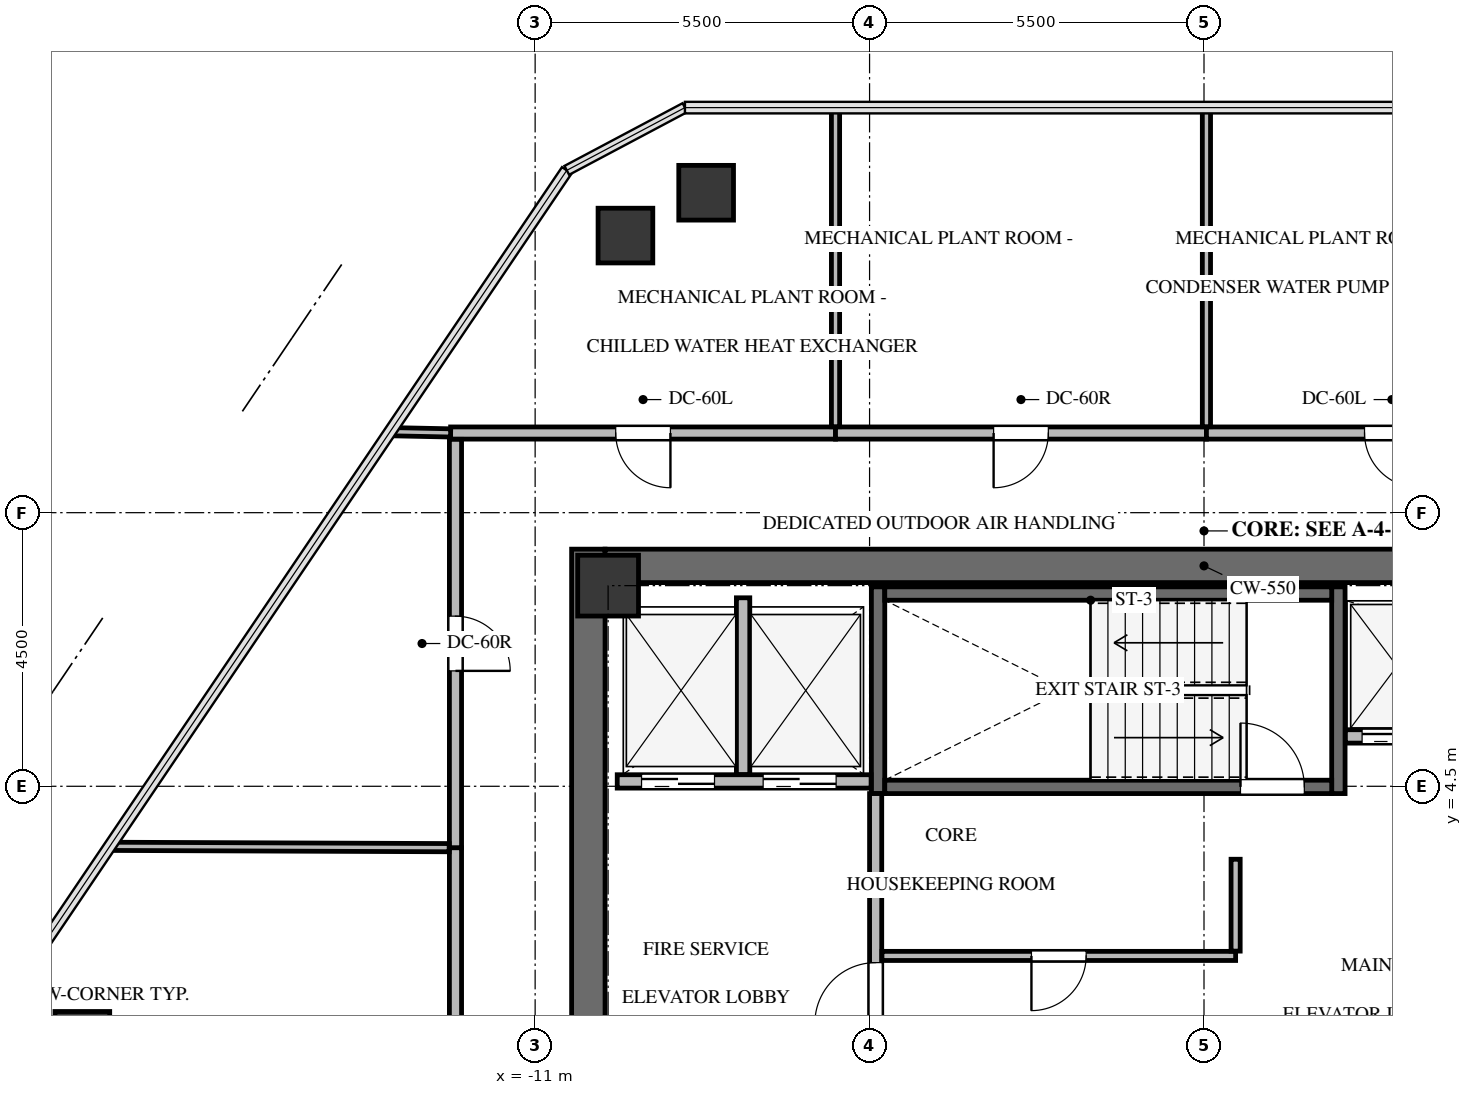
"""IFC4 building model, lengths in metres.
Left out: names, types, materials, properties, quantities, classifications, styles, units other than length and angle.
Written with IfcOpenShell. Run it as: python <this file> out.ifc"""

import sys

from ifc_helpers import new_model, si_unit, direction, frame, frame_2d, origin, origin_2d, place, context, subcontext, project, spatial, rectangle, extrude, source, transform, mapped, element, fill, save


model = new_model("IFC4")
c1 = context("Model", 3, precision=1e-05, world=origin(), true_north=direction((0.0, 1.0)))
c2 = subcontext(c1, "Body", "Model", "MODEL_VIEW")
j1 = project(units=[si_unit("LENGTHUNIT", "METRE"), si_unit("PLANEANGLEUNIT", "RADIAN")], contexts=[c1])
p1 = place(None, origin())
s1 = spatial("IfcSite", under=j1, at=p1, CompositionType="ELEMENT")
p2 = place(p1, origin())
s2 = spatial("IfcBuilding", under=s1, at=p2, CompositionType="ELEMENT")
p3 = place(p2, frame((0.0, 0.0, 264.9)))
s3 = spatial("IfcBuildingStorey", under=s2, at=p3, CompositionType="ELEMENT", Elevation=264.9)
p4 = place(p3, frame((-10.125, -8.4, 0.0), z_axis=(0.0, 0.0, 1.0), x_axis=(0.0, 1.0, 0.0)))
e1 = element("IfcWall", 1, at=p4, inside=s3, PredefinedType="SHEAR", context=c2, shape_type="SweptSolid", body=[
    extrude(rectangle(XDim=16.8, YDim=0.55, at=frame_2d((8.4, 0.0))), origin(), (0.0, 0.0, 1.0), 3.4),
])
p5 = place(p3, frame((-9.85, 8.125, 0.0), z_axis=(0.0, 0.0, 1.0), x_axis=(1.0, 0.0, 0.0)))
e2 = element("IfcWall", 2, at=p5, inside=s3, PredefinedType="SHEAR", context=c2, shape_type="SweptSolid", body=[
    extrude(rectangle(XDim=19.7, YDim=0.55, at=frame_2d((9.85, 0.0))), origin(), (0.0, 0.0, 1.0), 3.4),
])
for number, where, z_axis, x_axis in (
    (3, (2.21, 4.38, -0.3), (0.0, 0.0, 1.0), (0.0, 1.0, 0.0)),
    (4, (-5.36, 7.78, -0.3), (0.0, 0.0, 1.0), (0.0, -1.0, 0.0)),
):
    element("IfcWall", number, at=place(p3, frame(where, z_axis=z_axis, x_axis=x_axis)), inside=s3, PredefinedType="SHEAR", context=c2, shape_type="SweptSolid", body=[
        extrude(rectangle(XDim=3.4, YDim=0.22, at=frame_2d((1.7, 0.0))), origin(), (0.0, 0.0, 1.0), 3.4),
    ])
p6 = place(p3, frame((-5.25, 4.49, -0.3), z_axis=(0.0, 0.0, 1.0), x_axis=(1.0, 0.0, 0.0)))
e5 = element("IfcWall", 5, at=p6, inside=s3, PredefinedType="SHEAR", context=c2, shape_type="SweptSolid", body=[
    extrude(rectangle(XDim=7.35, YDim=0.22, at=frame_2d((3.675, 0.0))), origin(), (0.0, 0.0, 1.0), 3.4),
])
p7 = place(p6, frame((5.85, 0.0, 0.0)))
e6 = element("IfcOpeningElement", 6, at=p7, cuts=e5, PredefinedType="OPENING", context=c2, shape_type="SweptSolid", body=[
    extrude(rectangle(XDim=1.05, YDim=2.15, at=frame_2d((0.525, 1.075))), frame((0.0, 0.12, 0.0), z_axis=(0.0, -1.0, 0.0), x_axis=(1.0, 0.0, 0.0)), (0.0, 0.0, 1.0), 0.24),
])
p8 = place(p3, frame((2.1, 7.67, -0.3), z_axis=(0.0, 0.0, 1.0), x_axis=(-1.0, 0.0, 0.0)))
e7 = element("IfcWall", 7, at=p8, inside=s3, PredefinedType="SHEAR", context=c2, shape_type="SweptSolid", body=[
    extrude(rectangle(XDim=7.35, YDim=0.22, at=frame_2d((3.675, 0.0))), origin(), (0.0, 0.0, 1.0), 3.4),
])
m1 = source(origin(), c2, "Body", "SweptSolid", [
    extrude(rectangle(XDim=1.0, YDim=1.0, at=origin_2d()), origin(), (0.0, 0.0, 1.0), 3.4),
])
p9 = place(p3, frame((-9.8, 7.8, -0.3), z_axis=(0.0, 0.0, 1.0), x_axis=(1.0, 0.0, 0.0)))
e8 = element("IfcColumn", 8, at=p9, inside=s3, PredefinedType="COLUMN", context=c2, shape_type="MappedRepresentation", body=[
    mapped(m1, transform((0.0, 0.0, 0.0), x_axis=(1.0, 0.0, 0.0), y_axis=(0.0, 1.0, 0.0), z_axis=(0.0, 0.0, 1.0), scale=1.0)),
])
m2 = source(origin(), c2, "Body", "SweptSolid", [
    extrude(rectangle(XDim=0.9, YDim=0.9, at=origin_2d()), origin(), (0.0, 0.0, 1.0), 3.4),
])
for number, where, z_axis, x_axis in (
    (9, (-18.446, 0.346, -0.3), (0.0, 0.0, 1.0), (1.0, 0.0, 0.0)),
    (10, (-9.515, 13.557, -0.3), (0.0, 0.0, 1.0), (1.0, 0.0, 0.0)),
    (11, (-8.188, 14.262, -0.3), (0.0, 0.0, 1.0), (1.0, 0.0, 0.0)),
):
    element("IfcColumn", number, at=place(p3, frame(where, z_axis=z_axis, x_axis=x_axis)), inside=s3, PredefinedType="COLUMN", context=c2, shape_type="MappedRepresentation", body=[
        mapped(m2, transform((0.0, 0.0, 0.0), x_axis=(1.0, 0.0, 0.0), y_axis=(0.0, 1.0, 0.0), z_axis=(0.0, 0.0, 1.0), scale=1.0)),
    ])
p10 = place(p3, frame((-9.65, 4.58, 0.0), z_axis=(0.0, 0.0, 1.0), x_axis=(1.0, 0.0, 0.0)))
e12 = element("IfcWall", 12, at=p10, inside=s3, PredefinedType="SOLIDWALL", context=c2, shape_type="SweptSolid", body=[
    extrude(rectangle(XDim=4.175, YDim=0.22, at=frame_2d((2.087, 0.0))), origin(), (0.0, 0.0, 1.0), 3.085),
])
p11 = place(p10, frame((0.4, 0.0, 0.0)))
e13 = element("IfcOpeningElement", 13, at=p11, cuts=e12, PredefinedType="OPENING", context=c2, shape_type="SweptSolid", body=[
    extrude(rectangle(XDim=1.2, YDim=2.15, at=frame_2d((0.6, 1.075))), frame((0.0, 0.12, 0.0), z_axis=(0.0, -1.0, 0.0), x_axis=(1.0, 0.0, 0.0)), (0.0, 0.0, 1.0), 0.24),
])
p12 = place(p10, frame((2.4, 0.0, 0.0)))
e14 = element("IfcOpeningElement", 14, at=p12, cuts=e12, PredefinedType="OPENING", context=c2, shape_type="SweptSolid", body=[
    extrude(rectangle(XDim=1.2, YDim=2.15, at=frame_2d((0.6, 1.075))), frame((0.0, 0.12, 0.0), z_axis=(0.0, -1.0, 0.0), x_axis=(1.0, 0.0, 0.0)), (0.0, 0.0, 1.0), 0.24),
])
p13 = place(p3, frame((-7.58, 4.694, 0.0), z_axis=(0.0, 0.0, 1.0), x_axis=(0.0, 1.0, 0.0)))
e15 = element("IfcWall", 15, at=p13, inside=s3, PredefinedType="SOLIDWALL", context=c2, shape_type="SweptSolid", body=[
    extrude(rectangle(XDim=2.906, YDim=0.22, at=frame_2d((1.453, 0.0))), origin(), (0.0, 0.0, 1.0), 3.085),
])
p14 = place(p3, frame((-5.4, 0.354, 0.0), z_axis=(0.0, 0.0, 1.0), x_axis=(0.0, 1.0, 0.0)))
e16 = element("IfcWall", 16, at=p14, inside=s3, PredefinedType="SOLIDWALL", context=c2, shape_type="SweptSolid", body=[
    extrude(rectangle(XDim=4.026, YDim=0.2, at=frame_2d((2.013, 0.0))), origin(), (0.0, 0.0, 1.0), 3.085),
])
p15 = place(p14, frame((0.246, 0.0, 0.0)))
e17 = element("IfcOpeningElement", 17, at=p15, cuts=e16, PredefinedType="OPENING", context=c2, shape_type="SweptSolid", body=[
    extrude(rectangle(XDim=1.0, YDim=2.15, at=frame_2d((0.5, 1.075))), frame((0.0, 0.11, 0.0), z_axis=(0.0, -1.0, 0.0), x_axis=(1.0, 0.0, 0.0)), (0.0, 0.0, 1.0), 0.22),
])
p16 = place(p3, frame((2.325, 5.32, 0.0), z_axis=(0.0, 0.0, 1.0), x_axis=(1.0, 0.0, 0.0)))
e18 = element("IfcWall", 18, at=p16, inside=s3, PredefinedType="SOLIDWALL", context=c2, shape_type="SweptSolid", body=[
    extrude(rectangle(XDim=7.325, YDim=0.22, at=frame_2d((3.663, 0.0))), origin(), (0.0, 0.0, 1.0), 3.085),
])
p17 = place(p16, frame((0.275, 0.0, 0.0)))
e19 = element("IfcOpeningElement", 19, at=p17, cuts=e18, PredefinedType="OPENING", context=c2, shape_type="SweptSolid", body=[
    extrude(rectangle(XDim=1.1, YDim=2.15, at=frame_2d((0.55, 1.075))), frame((0.0, 0.12, 0.0), z_axis=(0.0, -1.0, 0.0), x_axis=(1.0, 0.0, 0.0)), (0.0, 0.0, 1.0), 0.24),
])
p18 = place(p16, frame((2.045, 0.0, 0.0)))
e20 = element("IfcOpeningElement", 20, at=p18, cuts=e18, PredefinedType="OPENING", context=c2, shape_type="SweptSolid", body=[
    extrude(rectangle(XDim=1.1, YDim=2.15, at=frame_2d((0.55, 1.075))), frame((0.0, 0.12, 0.0), z_axis=(0.0, -1.0, 0.0), x_axis=(1.0, 0.0, 0.0)), (0.0, 0.0, 1.0), 0.24),
])
p19 = place(p16, frame((3.815, 0.0, 0.0)))
e21 = element("IfcOpeningElement", 21, at=p19, cuts=e18, PredefinedType="OPENING", context=c2, shape_type="SweptSolid", body=[
    extrude(rectangle(XDim=1.1, YDim=2.15, at=frame_2d((0.55, 1.075))), frame((0.0, 0.12, 0.0), z_axis=(0.0, -1.0, 0.0), x_axis=(1.0, 0.0, 0.0)), (0.0, 0.0, 1.0), 0.24),
])
p20 = place(p16, frame((5.585, 0.0, 0.0)))
e22 = element("IfcOpeningElement", 22, at=p20, cuts=e18, PredefinedType="OPENING", context=c2, shape_type="SweptSolid", body=[
    extrude(rectangle(XDim=1.1, YDim=2.15, at=frame_2d((0.55, 1.075))), frame((0.0, 0.12, 0.0), z_axis=(0.0, -1.0, 0.0), x_axis=(1.0, 0.0, 0.0)), (0.0, 0.0, 1.0), 0.24),
])
p21 = place(p3, frame((0.52, 1.71, 0.0), z_axis=(0.0, 0.0, 1.0), x_axis=(-1.0, 0.0, 0.0)))
e23 = element("IfcWall", 23, at=p21, inside=s3, PredefinedType="PARTITIONING", context=c2, shape_type="SweptSolid", body=[
    extrude(rectangle(XDim=5.816, YDim=0.15, at=frame_2d((2.908, 0.0))), origin(), (0.0, 0.0, 1.0), 3.085),
])
p22 = place(p21, frame((2.458, 0.0, 0.0)))
e24 = element("IfcOpeningElement", 24, at=p22, cuts=e23, PredefinedType="OPENING", context=c2, shape_type="SweptSolid", body=[
    extrude(rectangle(XDim=0.9, YDim=2.05, at=frame_2d((0.45, 1.025))), frame((0.0, 0.085, 0.0), z_axis=(0.0, -1.0, 0.0), x_axis=(1.0, 0.0, 0.0)), (0.0, 0.0, 1.0), 0.17),
])
p23 = place(p3, frame((0.52, 3.3, 0.0), z_axis=(0.0, 0.0, 1.0), x_axis=(0.0, -1.0, 0.0)))
e25 = element("IfcWall", 25, at=p23, inside=s3, PredefinedType="PARTITIONING", context=c2, shape_type="SweptSolid", body=[
    extrude(rectangle(XDim=1.511, YDim=0.15, at=frame_2d((0.755, 0.0))), origin(), (0.0, 0.0, 1.0), 3.085),
])
p24 = place(p3, frame((-6.06, 10.31, 0.0), z_axis=(0.0, 0.0, 1.0), x_axis=(-1.0, 0.0, 0.0)))
e26 = element("IfcWall", 26, at=p24, inside=s3, PredefinedType="SOLIDWALL", context=c2, shape_type="SweptSolid", body=[
    extrude(rectangle(XDim=6.33, YDim=0.2, at=frame_2d((3.165, 0.0))), origin(), (0.0, 0.0, 1.0), 2.342),
])
p25 = place(p24, frame((2.715, 0.0, 0.0)))
e27 = element("IfcOpeningElement", 27, at=p25, cuts=e26, PredefinedType="OPENING", context=c2, shape_type="SweptSolid", body=[
    extrude(rectangle(XDim=0.9, YDim=2.05, at=frame_2d((0.45, 1.025))), frame((0.0, 0.11, 0.0), z_axis=(0.0, -1.0, 0.0), x_axis=(1.0, 0.0, 0.0)), (0.0, 0.0, 1.0), 0.22),
])
p26 = place(p3, frame((0.04, 10.31, 0.0), z_axis=(0.0, 0.0, 1.0), x_axis=(-1.0, 0.0, 0.0)))
e28 = element("IfcWall", 28, at=p26, inside=s3, PredefinedType="SOLIDWALL", context=c2, shape_type="SweptSolid", body=[
    extrude(rectangle(XDim=6.1, YDim=0.2, at=frame_2d((3.05, 0.0))), origin(), (0.0, 0.0, 1.0), 2.648),
])
p27 = place(p26, frame((2.6, 0.0, 0.0)))
e29 = element("IfcOpeningElement", 29, at=p27, cuts=e28, PredefinedType="OPENING", context=c2, shape_type="SweptSolid", body=[
    extrude(rectangle(XDim=0.9, YDim=2.05, at=frame_2d((0.45, 1.025))), frame((0.0, 0.11, 0.0), z_axis=(0.0, -1.0, 0.0), x_axis=(1.0, 0.0, 0.0)), (0.0, 0.0, 1.0), 0.22),
])
p28 = place(p3, frame((6.14, 10.31, 0.0), z_axis=(0.0, 0.0, 1.0), x_axis=(-1.0, 0.0, 0.0)))
e30 = element("IfcWall", 30, at=p28, inside=s3, PredefinedType="SOLIDWALL", context=c2, shape_type="SweptSolid", body=[
    extrude(rectangle(XDim=6.1, YDim=0.2, at=frame_2d((3.05, 0.0))), origin(), (0.0, 0.0, 1.0), 2.648),
])
p29 = place(p28, frame((2.6, 0.0, 0.0)))
e31 = element("IfcOpeningElement", 31, at=p29, cuts=e30, PredefinedType="OPENING", context=c2, shape_type="SweptSolid", body=[
    extrude(rectangle(XDim=0.9, YDim=2.05, at=frame_2d((0.45, 1.025))), frame((0.0, 0.11, 0.0), z_axis=(0.0, -1.0, 0.0), x_axis=(1.0, 0.0, 0.0)), (0.0, 0.0, 1.0), 0.22),
])
p30 = place(p3, frame((-12.31, 3.49, 0.0), z_axis=(0.0, 0.0, 1.0), x_axis=(0.0, -1.0, 0.0)))
e32 = element("IfcWall", 32, at=p30, inside=s3, PredefinedType="SOLIDWALL", context=c2, shape_type="SweptSolid", body=[
    extrude(rectangle(XDim=6.9, YDim=0.2, at=frame_2d((3.45, 0.0))), origin(), (0.0, 0.0, 1.0), 2.342),
])
p31 = place(p30, frame((3.0, 0.0, 0.0)))
e33 = element("IfcOpeningElement", 33, at=p31, cuts=e32, PredefinedType="OPENING", context=c2, shape_type="SweptSolid", body=[
    extrude(rectangle(XDim=0.9, YDim=2.05, at=frame_2d((0.45, 1.025))), frame((0.0, 0.11, 0.0), z_axis=(0.0, -1.0, 0.0), x_axis=(1.0, 0.0, 0.0)), (0.0, 0.0, 1.0), 0.22),
])
p32 = place(p3, frame((-12.31, 10.206, 0.0), z_axis=(0.0, 0.0, 1.0), x_axis=(0.0, -1.0, 0.0)))
e34 = element("IfcWall", 34, at=p32, inside=s3, PredefinedType="SOLIDWALL", context=c2, shape_type="SweptSolid", body=[
    extrude(rectangle(XDim=6.716, YDim=0.2, at=frame_2d((3.358, 0.0))), origin(), (0.0, 0.0, 1.0), 2.439),
])
p33 = place(p32, frame((2.908, 0.0, 0.0)))
e35 = element("IfcOpeningElement", 35, at=p33, cuts=e34, PredefinedType="OPENING", context=c2, shape_type="SweptSolid", body=[
    extrude(rectangle(XDim=0.9, YDim=2.05, at=frame_2d((0.45, 1.025))), frame((0.0, 0.11, 0.0), z_axis=(0.0, -1.0, 0.0), x_axis=(1.0, 0.0, 0.0)), (0.0, 0.0, 1.0), 0.22),
])
p34 = place(p3, frame((-6.06, 15.662, 0.0), z_axis=(0.0, 0.0, 1.0), x_axis=(0.0, -1.0, 0.0)))
e36 = element("IfcWall", 36, at=p34, inside=s3, PredefinedType="PARTITIONING", context=c2, shape_type="SweptSolid", body=[
    extrude(rectangle(XDim=5.248, YDim=0.135, at=frame_2d((2.624, 0.0))), origin(), (0.0, 0.0, 1.0), 2.439),
])
p35 = place(p3, frame((-12.39, 10.312, 0.0), z_axis=(0.0, 0.0, 1.0), x_axis=(-0.999782630862, 0.020849245246, 0.0)))
e37 = element("IfcWall", 37, at=p35, inside=s3, PredefinedType="PARTITIONING", context=c2, shape_type="SweptSolid", body=[
    extrude(rectangle(XDim=0.995, YDim=0.135, at=frame_2d((0.498, 0.0))), origin(), (0.0, 0.0, 1.0), 3.085),
])
p36 = place(p3, frame((0.04, 15.662, 0.0), z_axis=(0.0, 0.0, 1.0), x_axis=(0.0, -1.0, 0.0)))
e38 = element("IfcWall", 38, at=p36, inside=s3, PredefinedType="PARTITIONING", context=c2, shape_type="SweptSolid", body=[
    extrude(rectangle(XDim=5.248, YDim=0.135, at=frame_2d((2.624, 0.0))), origin(), (0.0, 0.0, 1.0), 2.439),
])
p37 = place(p3, frame((-17.996, 3.512, 0.0), z_axis=(0.0, 0.0, 1.0), x_axis=(0.99999225143, -0.003936632956, 0.0)))
e39 = element("IfcWall", 39, at=p37, inside=s3, PredefinedType="PARTITIONING", context=c2, shape_type="SweptSolid", body=[
    extrude(rectangle(XDim=5.582, YDim=0.135, at=frame_2d((2.791, 0.0))), origin(), (0.0, 0.0, 1.0), 2.439),
])
m3 = source(origin(), c2, "Body", "SweptSolid", [
    extrude(rectangle(XDim=1.05, YDim=2.15, at=frame_2d((0.525, 1.075))), frame((0.0, 0.025, 0.0), z_axis=(0.0, -1.0, 0.0), x_axis=(1.0, 0.0, 0.0)), (0.0, 0.0, 1.0), 0.05),
])
p38 = place(p7, origin())
e40 = element("IfcDoor", 40, at=p38, inside=s3, OperationType="SINGLE_SWING_LEFT", PredefinedType="DOOR", context=c2, shape_type="MappedRepresentation", body=[
    mapped(m3, transform((0.0, 0.0, 0.0), x_axis=(1.0, 0.0, 0.0), y_axis=(0.0, 1.0, 0.0), z_axis=(0.0, 0.0, 1.0), scale=1.0)),
])
fill(e6, e40)
m4 = source(origin(), c2, "Body", "SweptSolid", [
    extrude(rectangle(XDim=1.2, YDim=2.15, at=frame_2d((0.6, 1.075))), frame((0.0, 0.025, 0.0), z_axis=(0.0, -1.0, 0.0), x_axis=(1.0, 0.0, 0.0)), (0.0, 0.0, 1.0), 0.05),
])
p39 = place(p11, origin())
e41 = element("IfcDoor", 41, at=p39, inside=s3, OperationType="DOUBLE_DOOR_SLIDING", PredefinedType="DOOR", context=c2, shape_type="MappedRepresentation", body=[
    mapped(m4, transform((0.0, 0.0, 0.0), x_axis=(1.0, 0.0, 0.0), y_axis=(0.0, 1.0, 0.0), z_axis=(0.0, 0.0, 1.0), scale=1.0)),
])
fill(e13, e41)
p40 = place(p12, origin())
e42 = element("IfcDoor", 42, at=p40, inside=s3, OperationType="DOUBLE_DOOR_SLIDING", PredefinedType="DOOR", context=c2, shape_type="MappedRepresentation", body=[
    mapped(m4, transform((0.0, 0.0, 0.0), x_axis=(1.0, 0.0, 0.0), y_axis=(0.0, 1.0, 0.0), z_axis=(0.0, 0.0, 1.0), scale=1.0)),
])
fill(e14, e42)
m5 = source(origin(), c2, "Body", "SweptSolid", [
    extrude(rectangle(XDim=1.0, YDim=2.15, at=frame_2d((0.5, 1.075))), frame((0.0, 0.025, 0.0), z_axis=(0.0, -1.0, 0.0), x_axis=(1.0, 0.0, 0.0)), (0.0, 0.0, 1.0), 0.05),
])
p41 = place(p15, origin())
e43 = element("IfcDoor", 43, at=p41, inside=s3, OperationType="SINGLE_SWING_LEFT", PredefinedType="DOOR", context=c2, shape_type="MappedRepresentation", body=[
    mapped(m5, transform((0.0, 0.0, 0.0), x_axis=(1.0, 0.0, 0.0), y_axis=(0.0, 1.0, 0.0), z_axis=(0.0, 0.0, 1.0), scale=1.0)),
])
fill(e17, e43)
m6 = source(origin(), c2, "Body", "SweptSolid", [
    extrude(rectangle(XDim=1.1, YDim=2.15, at=frame_2d((0.55, 1.075))), frame((0.0, 0.025, 0.0), z_axis=(0.0, -1.0, 0.0), x_axis=(1.0, 0.0, 0.0)), (0.0, 0.0, 1.0), 0.05),
])
p42 = place(p17, origin())
e44 = element("IfcDoor", 44, at=p42, inside=s3, OperationType="DOUBLE_DOOR_SLIDING", PredefinedType="DOOR", context=c2, shape_type="MappedRepresentation", body=[
    mapped(m6, transform((0.0, 0.0, 0.0), x_axis=(1.0, 0.0, 0.0), y_axis=(0.0, 1.0, 0.0), z_axis=(0.0, 0.0, 1.0), scale=1.0)),
])
fill(e19, e44)
m7 = source(origin(), c2, "Body", "SweptSolid", [
    extrude(rectangle(XDim=0.9, YDim=2.05, at=frame_2d((0.45, 1.025))), frame((0.0, 0.025, 0.0), z_axis=(0.0, -1.0, 0.0), x_axis=(1.0, 0.0, 0.0)), (0.0, 0.0, 1.0), 0.05),
])
p43 = place(p22, origin())
e45 = element("IfcDoor", 45, at=p43, inside=s3, OperationType="SINGLE_SWING_RIGHT", PredefinedType="DOOR", context=c2, shape_type="MappedRepresentation", body=[
    mapped(m7, transform((0.0, 0.0, 0.0), x_axis=(1.0, 0.0, 0.0), y_axis=(0.0, 1.0, 0.0), z_axis=(0.0, 0.0, 1.0), scale=1.0)),
])
fill(e24, e45)
m8 = source(origin(), c2, "Body", "SweptSolid", [
    extrude(rectangle(XDim=0.9, YDim=2.05, at=frame_2d((0.45, 1.025))), frame((0.0, 0.025, 0.0), z_axis=(0.0, -1.0, 0.0), x_axis=(1.0, 0.0, 0.0)), (0.0, 0.0, 1.0), 0.05),
])
p44 = place(p25, origin())
e46 = element("IfcDoor", 46, at=p44, inside=s3, OperationType="SINGLE_SWING_LEFT", PredefinedType="DOOR", context=c2, shape_type="MappedRepresentation", body=[
    mapped(m8, transform((0.0, 0.0, 0.0), x_axis=(1.0, 0.0, 0.0), y_axis=(0.0, 1.0, 0.0), z_axis=(0.0, 0.0, 1.0), scale=1.0)),
])
fill(e27, e46)
p45 = place(p27, origin())
e47 = element("IfcDoor", 47, at=p45, inside=s3, OperationType="SINGLE_SWING_RIGHT", PredefinedType="DOOR", context=c2, shape_type="MappedRepresentation", body=[
    mapped(m7, transform((0.0, 0.0, 0.0), x_axis=(1.0, 0.0, 0.0), y_axis=(0.0, 1.0, 0.0), z_axis=(0.0, 0.0, 1.0), scale=1.0)),
])
fill(e29, e47)
p46 = place(p29, origin())
e48 = element("IfcDoor", 48, at=p46, inside=s3, OperationType="SINGLE_SWING_LEFT", PredefinedType="DOOR", context=c2, shape_type="MappedRepresentation", body=[
    mapped(m8, transform((0.0, 0.0, 0.0), x_axis=(1.0, 0.0, 0.0), y_axis=(0.0, 1.0, 0.0), z_axis=(0.0, 0.0, 1.0), scale=1.0)),
])
fill(e31, e48)
p47 = place(p33, origin())
e49 = element("IfcDoor", 49, at=p47, inside=s3, OperationType="SINGLE_SWING_RIGHT", PredefinedType="DOOR", context=c2, shape_type="MappedRepresentation", body=[
    mapped(m7, transform((0.0, 0.0, 0.0), x_axis=(1.0, 0.0, 0.0), y_axis=(0.0, 1.0, 0.0), z_axis=(0.0, 0.0, 1.0), scale=1.0)),
])
fill(e35, e49)
save(model, sys.argv[1])
